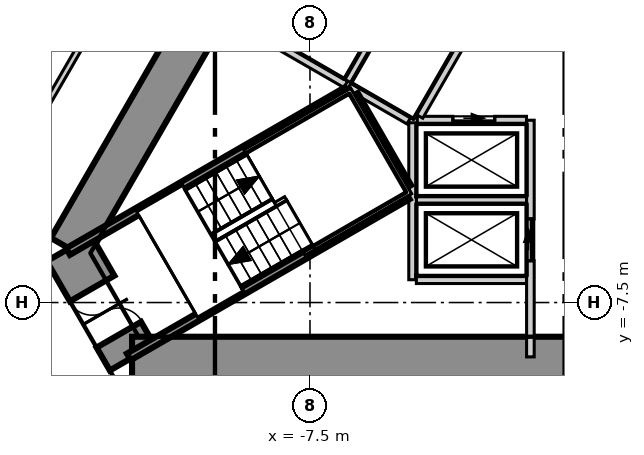
"""IFC4 building model, lengths in metres.
Left out: names, types, materials, properties, quantities, classifications, styles, units other than length and angle.
Written with IfcOpenShell. Run it as: python <this file> out.ifc"""

import sys

from ifc_helpers import new_model, si_unit, direction, frame, frame_2d, origin, place, context, subcontext, project, spatial, polyline, rectangle, outline, extrude, element, fill, save


model = new_model("IFC4")
c1 = context("Model", 3, precision=1e-05, world=origin(), true_north=direction((0.0, 1.0)))
c2 = subcontext(c1, "Body", "Model", "MODEL_VIEW")
j1 = project(units=[si_unit("LENGTHUNIT", "METRE"), si_unit("PLANEANGLEUNIT", "RADIAN")], contexts=[c1])
p1 = place(None, origin())
s1 = spatial("IfcSite", under=j1, at=p1, CompositionType="ELEMENT")
p2 = place(p1, origin())
s2 = spatial("IfcBuilding", under=s1, at=p2, CompositionType="ELEMENT")
p3 = place(p2, frame((0.0, 0.0, 95.3)))
s3 = spatial("IfcBuildingStorey", under=s2, at=p3, CompositionType="ELEMENT", Elevation=95.3)
p4 = place(p3, frame((-1.66, 15.025, -0.3), z_axis=(0.0, 0.0, 1.0), x_axis=(-0.500003780125, -0.866023221317, 0.0)))
e1 = element("IfcWall", 1, at=p4, inside=s3, PredefinedType="SHEAR", context=c2, shape_type="SweptSolid", body=[
    extrude(outline(polyline([(-0.462, -0.55), (1.483, -0.55), (3.428, -0.55), (5.374, -0.55), (7.319, -0.55), (9.264, -0.55), (11.209, -0.55), (13.155, -0.55), (15.1, -0.55), (17.045, -0.55), (18.99, -0.55), (20.936, -0.55), (22.881, -0.55), (24.826, -0.55), (23.902, 0.55), (21.949, 0.55), (19.995, 0.55), (18.042, 0.55), (16.089, 0.55), (14.135, 0.55), (12.182, 0.55), (10.229, 0.55), (8.275, 0.55), (6.322, 0.55), (4.369, 0.55), (2.415, 0.55), (0.462, 0.55), (-0.462, -0.55)])), origin(), (0.0, 0.0, 1.0), 4.2),
])
p5 = place(p4, frame((11.776, 0.0, 0.3)))
e2 = element("IfcOpeningElement", 2, at=p5, cuts=e1, PredefinedType="OPENING", context=c2, shape_type="SweptSolid", body=[
    extrude(rectangle(XDim=1.1, YDim=2.1, at=frame_2d((0.55, 1.05))), frame((0.0, 0.56, 0.0), z_axis=(0.0, -1.0, 0.0), x_axis=(1.0, 0.0, 0.0)), (0.0, 0.0, 1.0), 1.12),
])
p6 = place(p3, frame((-13.842, -6.075, -0.3), z_axis=(0.0, 0.0, 1.0), x_axis=(0.500061949227, -0.865989634427, 0.0)))
e3 = element("IfcWall", 3, at=p6, inside=s3, PredefinedType="SHEAR", context=c2, shape_type="SweptSolid", body=[
    extrude(outline(polyline([(-0.245, -0.675), (1.66, -0.675), (3.565, -0.675), (3.075, 0.675), (1.66, 0.675), (0.245, 0.675), (-0.245, -0.675)])), origin(), (0.0, 0.0, 1.0), 4.2),
])
p7 = place(p6, frame((1.221, 0.0, 0.3)))
e4 = element("IfcOpeningElement", 4, at=p7, cuts=e3, PredefinedType="OPENING", context=c2, shape_type="SweptSolid", body=[
    extrude(rectangle(XDim=1.4, YDim=2.1, at=frame_2d((0.7, 1.05))), frame((0.0, 0.685, 0.0), z_axis=(0.0, -1.0, 0.0), x_axis=(1.0, 0.0, 0.0)), (0.0, 0.0, 1.0), 1.37),
])
p8 = place(p3, frame((-12.182, -8.95, -0.3), z_axis=(0.0, 0.0, 1.0), x_axis=(1.0, 0.0, 0.0)))
e5 = element("IfcWall", 5, at=p8, inside=s3, PredefinedType="SHEAR", context=c2, shape_type="SweptSolid", body=[
    extrude(outline(polyline([(-0.462, -0.55), (1.483, -0.55), (3.428, -0.55), (5.374, -0.55), (7.319, -0.55), (9.264, -0.55), (11.209, -0.55), (13.155, -0.55), (15.1, -0.55), (17.045, -0.55), (18.99, -0.55), (20.936, -0.55), (22.881, -0.55), (24.826, -0.55), (23.902, 0.55), (21.949, 0.55), (19.995, 0.55), (18.042, 0.55), (16.089, 0.55), (14.135, 0.55), (12.182, 0.55), (10.229, 0.55), (8.275, 0.55), (6.322, 0.55), (4.369, 0.55), (2.415, 0.55), (0.462, 0.55), (-0.462, -0.55)])), origin(), (0.0, 0.0, 1.0), 4.2),
])
p9 = place(p3, frame((-3.234, 36.072, 0.0), z_axis=(0.0, 0.0, 1.0), x_axis=(-0.500009108245, -0.866020145073, 0.0)))
e6 = element("IfcWall", 6, at=p9, inside=s3, PredefinedType="ELEMENTEDWALL", context=c2, shape_type="SweptSolid", body=[
    extrude(rectangle(XDim=59.225, YDim=0.2, at=frame_2d((29.613, 0.0))), origin(), (0.0, 0.0, 1.0), 3.9),
])
p10 = place(p9, frame((2.042, 0.0, 0.9)))
e7 = element("IfcOpeningElement", 7, at=p10, cuts=e6, PredefinedType="OPENING", context=c2, shape_type="SweptSolid", body=[
    extrude(rectangle(XDim=5.6, YDim=2.5, at=frame_2d((2.8, 1.25))), frame((0.0, 0.11, 0.0), z_axis=(0.0, -1.0, 0.0), x_axis=(1.0, 0.0, 0.0)), (0.0, 0.0, 1.0), 0.22),
])
p11 = place(p9, frame((9.122, 0.0, 0.9)))
e8 = element("IfcOpeningElement", 8, at=p11, cuts=e6, PredefinedType="OPENING", context=c2, shape_type="SweptSolid", body=[
    extrude(rectangle(XDim=5.6, YDim=2.5, at=frame_2d((2.8, 1.25))), frame((0.0, 0.11, 0.0), z_axis=(0.0, -1.0, 0.0), x_axis=(1.0, 0.0, 0.0)), (0.0, 0.0, 1.0), 0.22),
])
p12 = place(p9, frame((16.202, 0.0, 0.9)))
e9 = element("IfcOpeningElement", 9, at=p12, cuts=e6, PredefinedType="OPENING", context=c2, shape_type="SweptSolid", body=[
    extrude(rectangle(XDim=5.6, YDim=2.5, at=frame_2d((2.8, 1.25))), frame((0.0, 0.11, 0.0), z_axis=(0.0, -1.0, 0.0), x_axis=(1.0, 0.0, 0.0)), (0.0, 0.0, 1.0), 0.22),
])
p13 = place(p9, frame((23.282, 0.0, 0.9)))
e10 = element("IfcOpeningElement", 10, at=p13, cuts=e6, PredefinedType="OPENING", context=c2, shape_type="SweptSolid", body=[
    extrude(rectangle(XDim=5.6, YDim=2.5, at=frame_2d((2.8, 1.25))), frame((0.0, 0.11, 0.0), z_axis=(0.0, -1.0, 0.0), x_axis=(1.0, 0.0, 0.0)), (0.0, 0.0, 1.0), 0.22),
])
p14 = place(p9, frame((30.362, 0.0, 0.9)))
e11 = element("IfcOpeningElement", 11, at=p14, cuts=e6, PredefinedType="OPENING", context=c2, shape_type="SweptSolid", body=[
    extrude(rectangle(XDim=5.6, YDim=2.5, at=frame_2d((2.8, 1.25))), frame((0.0, 0.11, 0.0), z_axis=(0.0, -1.0, 0.0), x_axis=(1.0, 0.0, 0.0)), (0.0, 0.0, 1.0), 0.22),
])
p15 = place(p9, frame((37.442, 0.0, 0.9)))
e12 = element("IfcOpeningElement", 12, at=p15, cuts=e6, PredefinedType="OPENING", context=c2, shape_type="SweptSolid", body=[
    extrude(rectangle(XDim=5.6, YDim=2.5, at=frame_2d((2.8, 1.25))), frame((0.0, 0.11, 0.0), z_axis=(0.0, -1.0, 0.0), x_axis=(1.0, 0.0, 0.0)), (0.0, 0.0, 1.0), 0.22),
])
p16 = place(p9, frame((44.522, 0.0, 0.9)))
e13 = element("IfcOpeningElement", 13, at=p16, cuts=e6, PredefinedType="OPENING", context=c2, shape_type="SweptSolid", body=[
    extrude(rectangle(XDim=5.6, YDim=2.5, at=frame_2d((2.8, 1.25))), frame((0.0, 0.11, 0.0), z_axis=(0.0, -1.0, 0.0), x_axis=(1.0, 0.0, 0.0)), (0.0, 0.0, 1.0), 0.22),
])
p17 = place(p9, frame((51.602, 0.0, 0.9)))
e14 = element("IfcOpeningElement", 14, at=p17, cuts=e6, PredefinedType="OPENING", context=c2, shape_type="SweptSolid", body=[
    extrude(rectangle(XDim=5.6, YDim=2.5, at=frame_2d((2.8, 1.25))), frame((0.0, 0.11, 0.0), z_axis=(0.0, -1.0, 0.0), x_axis=(1.0, 0.0, 0.0)), (0.0, 0.0, 1.0), 0.22),
])
p18 = place(p3, frame((-16.685, -6.2, 0.0), z_axis=(0.0, 0.0, 1.0), x_axis=(0.500002442456, 0.866023993627, 0.0)))
e15 = element("IfcWall", 15, at=p18, inside=s3, PredefinedType="PARTITIONING", context=c2, shape_type="SweptSolid", body=[
    extrude(rectangle(XDim=27.424, YDim=0.15, at=frame_2d((13.712, 0.0))), origin(), (0.0, 0.0, 1.0), 3.9),
])
p19 = place(p18, frame((23.508, 0.0, 0.0)))
e16 = element("IfcOpeningElement", 16, at=p19, cuts=e15, PredefinedType="OPENING", context=c2, shape_type="SweptSolid", body=[
    extrude(rectangle(XDim=1.2, YDim=2.1, at=frame_2d((0.6, 1.05))), frame((0.0, 0.085, 0.0), z_axis=(0.0, -1.0, 0.0), x_axis=(1.0, 0.0, 0.0)), (0.0, 0.0, 1.0), 0.17),
])
p20 = place(p18, frame((13.112, 0.0, 0.0)))
e17 = element("IfcOpeningElement", 17, at=p20, cuts=e15, PredefinedType="OPENING", context=c2, shape_type="SweptSolid", body=[
    extrude(rectangle(XDim=1.2, YDim=2.1, at=frame_2d((0.6, 1.05))), frame((0.0, 0.085, 0.0), z_axis=(0.0, -1.0, 0.0), x_axis=(1.0, 0.0, 0.0)), (0.0, 0.0, 1.0), 0.17),
])
p21 = place(p18, frame((2.716, 0.0, 0.0)))
e18 = element("IfcOpeningElement", 18, at=p21, cuts=e15, PredefinedType="OPENING", context=c2, shape_type="SweptSolid", body=[
    extrude(rectangle(XDim=1.2, YDim=2.1, at=frame_2d((0.6, 1.05))), frame((0.0, 0.085, 0.0), z_axis=(0.0, -1.0, 0.0), x_axis=(1.0, 0.0, 0.0)), (0.0, 0.0, 1.0), 0.17),
])
p22 = place(p3, frame((-8.376, -0.707, 0.0), z_axis=(0.0, 0.0, 1.0), x_axis=(0.866067520717, -0.499927044236, 0.0)))
e19 = element("IfcWall", 19, at=p22, inside=s3, PredefinedType="SOLIDWALL", context=c2, shape_type="SweptSolid", body=[
    extrude(rectangle(XDim=2.1, YDim=0.2, at=frame_2d((1.05, 0.0))), origin(), (0.0, 0.0, 1.0), 3.9),
])
p23 = place(p3, frame((-4.7, -4.8, 0.0), z_axis=(0.0, 0.0, 1.0), x_axis=(1.0, 0.0, 0.0)))
e20 = element("IfcWall", 20, at=p23, inside=s3, PredefinedType="SOLIDWALL", context=c2, shape_type="SweptSolid", body=[
    extrude(rectangle(XDim=2.9, YDim=0.2, at=frame_2d((1.45, 0.0))), origin(), (0.0, 0.0, 1.0), 3.9),
])
p24 = place(p3, frame((-4.8, -6.9, 0.0), z_axis=(0.0, 0.0, 1.0), x_axis=(0.0, 1.0, 0.0)))
e21 = element("IfcWall", 21, at=p24, inside=s3, PredefinedType="SOLIDWALL", context=c2, shape_type="SweptSolid", body=[
    extrude(rectangle(XDim=4.131, YDim=0.2, at=frame_2d((2.065, 0.0))), origin(), (0.0, 0.0, 1.0), 3.9),
])
p25 = place(p3, frame((-4.7, -6.9, 0.0), z_axis=(0.0, 0.0, 1.0), x_axis=(1.0, 0.0, 0.0)))
e22 = element("IfcWall", 22, at=p25, inside=s3, PredefinedType="SOLIDWALL", context=c2, shape_type="SweptSolid", body=[
    extrude(rectangle(XDim=2.9, YDim=0.2, at=frame_2d((1.45, 0.0))), origin(), (0.0, 0.0, 1.0), 3.9),
])
p26 = place(p3, frame((-1.7, -8.93, 0.0), z_axis=(0.0, 0.0, 1.0), x_axis=(0.0, 1.0, 0.0)))
e23 = element("IfcWall", 23, at=p26, inside=s3, PredefinedType="SOLIDWALL", context=c2, shape_type="SweptSolid", body=[
    extrude(rectangle(XDim=6.227, YDim=0.2, at=frame_2d((3.114, 0.0))), origin(), (0.0, 0.0, 1.0), 3.9),
])
p27 = place(p26, frame((2.53, 0.0, 0.0)))
e24 = element("IfcOpeningElement", 24, at=p27, cuts=e23, PredefinedType="OPENING", context=c2, shape_type="SweptSolid", body=[
    extrude(rectangle(XDim=1.1, YDim=2.1, at=frame_2d((0.55, 1.05))), frame((0.0, 0.11, 0.0), z_axis=(0.0, -1.0, 0.0), x_axis=(1.0, 0.0, 0.0)), (0.0, 0.0, 1.0), 0.22),
])
p28 = place(p3, frame((-4.676, -2.7, 0.0), z_axis=(0.0, 0.0, 1.0), x_axis=(1.0, 0.0, 0.0)))
e25 = element("IfcWall", 25, at=p28, inside=s3, PredefinedType="SOLIDWALL", context=c2, shape_type="SweptSolid", body=[
    extrude(rectangle(XDim=2.873, YDim=0.2, at=frame_2d((1.437, 0.0))), origin(), (0.0, 0.0, 1.0), 3.9),
])
p29 = place(p28, frame((0.937, 0.0, 0.0)))
e26 = element("IfcOpeningElement", 26, at=p29, cuts=e25, PredefinedType="OPENING", context=c2, shape_type="SweptSolid", body=[
    extrude(rectangle(XDim=1.1, YDim=2.1, at=frame_2d((0.55, 1.05))), frame((0.0, 0.11, 0.0), z_axis=(0.0, -1.0, 0.0), x_axis=(1.0, 0.0, 0.0)), (0.0, 0.0, 1.0), 0.22),
])
p30 = place(p3, frame((-6.507, -1.67, 0.0), z_axis=(0.0, 0.0, 1.0), x_axis=(0.50012328804, 0.865954211699, 0.0)))
e27 = element("IfcWall", 27, at=p30, inside=s3, PredefinedType="SOLIDWALL", context=c2, shape_type="SweptSolid", body=[
    extrude(rectangle(XDim=2.9, YDim=0.2, at=frame_2d((1.45, 0.0))), origin(), (0.0, 0.0, 1.0), 3.9),
])
p31 = place(p3, frame((-6.47, -1.807, 0.0), z_axis=(0.0, 0.0, 1.0), x_axis=(0.865883195159, -0.500246231712, 0.0)))
e28 = element("IfcWall", 28, at=p31, inside=s3, PredefinedType="SOLIDWALL", context=c2, shape_type="SweptSolid", body=[
    extrude(rectangle(XDim=1.815, YDim=0.2, at=frame_2d((0.908, 0.0))), origin(), (0.0, 0.0, 1.0), 3.9),
])
p32 = place(p3, frame((-4.619, -2.6, 0.0), z_axis=(0.0, 0.0, 1.0), x_axis=(0.50009492287, 0.865970593103, 0.0)))
e29 = element("IfcWall", 29, at=p32, inside=s3, PredefinedType="SOLIDWALL", context=c2, shape_type="SweptSolid", body=[
    extrude(rectangle(XDim=2.761, YDim=0.2, at=frame_2d((1.381, 0.0))), origin(), (0.0, 0.0, 1.0), 3.9),
])
p33 = place(p3, frame((-13.867, -6.159, 0.0), z_axis=(0.0, 0.0, 1.0), x_axis=(0.866010926821, 0.500025073997, 0.0)))
e30 = element("IfcWall", 30, at=p33, inside=s3, PredefinedType="SOLIDWALL", context=c2, shape_type="SweptSolid", body=[
    extrude(rectangle(XDim=8.473, YDim=0.2, at=frame_2d((4.237, 0.0))), origin(), (0.0, 0.0, 1.0), 3.9),
])
p34 = place(p3, frame((-6.329, -2.038, 0.0), z_axis=(0.0, 0.0, 1.0), x_axis=(0.500200581029, -0.865909567298, 0.0)))
e31 = element("IfcWall", 31, at=p34, inside=s3, PredefinedType="SOLIDWALL", context=c2, shape_type="SweptSolid", body=[
    extrude(rectangle(XDim=2.799, YDim=0.2, at=frame_2d((1.399, 0.0))), origin(), (0.0, 0.0, 1.0), 3.9),
])
p35 = place(p3, frame((-12.267, -8.93, 0.0), z_axis=(0.0, 0.0, 1.0), x_axis=(0.866018130586, 0.500012597338, 0.0)))
e32 = element("IfcWall", 32, at=p35, inside=s3, PredefinedType="SOLIDWALL", context=c2, shape_type="SweptSolid", body=[
    extrude(rectangle(XDim=8.473, YDim=0.2, at=frame_2d((4.237, 0.0))), origin(), (0.0, 0.0, 1.0), 3.9),
])
p36 = place(p29, origin())
e33 = element("IfcDoor", 33, at=p36, inside=s3, OperationType="SLIDING_TO_LEFT", PredefinedType="DOOR", context=c2, shape_type="SweptSolid", body=[
    extrude(rectangle(XDim=1.1, YDim=2.1, at=frame_2d((0.55, 1.05))), frame((0.0, 0.025, 0.0), z_axis=(0.0, -1.0, 0.0), x_axis=(1.0, 0.0, 0.0)), (0.0, 0.0, 1.0), 0.05),
])
fill(e26, e33)
p37 = place(p27, origin())
e34 = element("IfcDoor", 34, at=p37, inside=s3, OperationType="SLIDING_TO_LEFT", PredefinedType="DOOR", context=c2, shape_type="SweptSolid", body=[
    extrude(rectangle(XDim=1.1, YDim=2.1, at=frame_2d((0.55, 1.05))), frame((0.0, 0.025, 0.0), z_axis=(0.0, -1.0, 0.0), x_axis=(1.0, 0.0, 0.0)), (0.0, 0.0, 1.0), 0.05),
])
fill(e24, e34)
p38 = place(p7, origin())
e35 = element("IfcDoor", 35, at=p38, inside=s3, OperationType="DOUBLE_DOOR_SINGLE_SWING", PredefinedType="DOOR", context=c2, shape_type="SweptSolid", body=[
    extrude(rectangle(XDim=1.4, YDim=2.1, at=frame_2d((0.7, 1.05))), frame((0.0, 0.025, 0.0), z_axis=(0.0, -1.0, 0.0), x_axis=(1.0, 0.0, 0.0)), (0.0, 0.0, 1.0), 0.05),
])
fill(e4, e35)
save(model, sys.argv[1])
